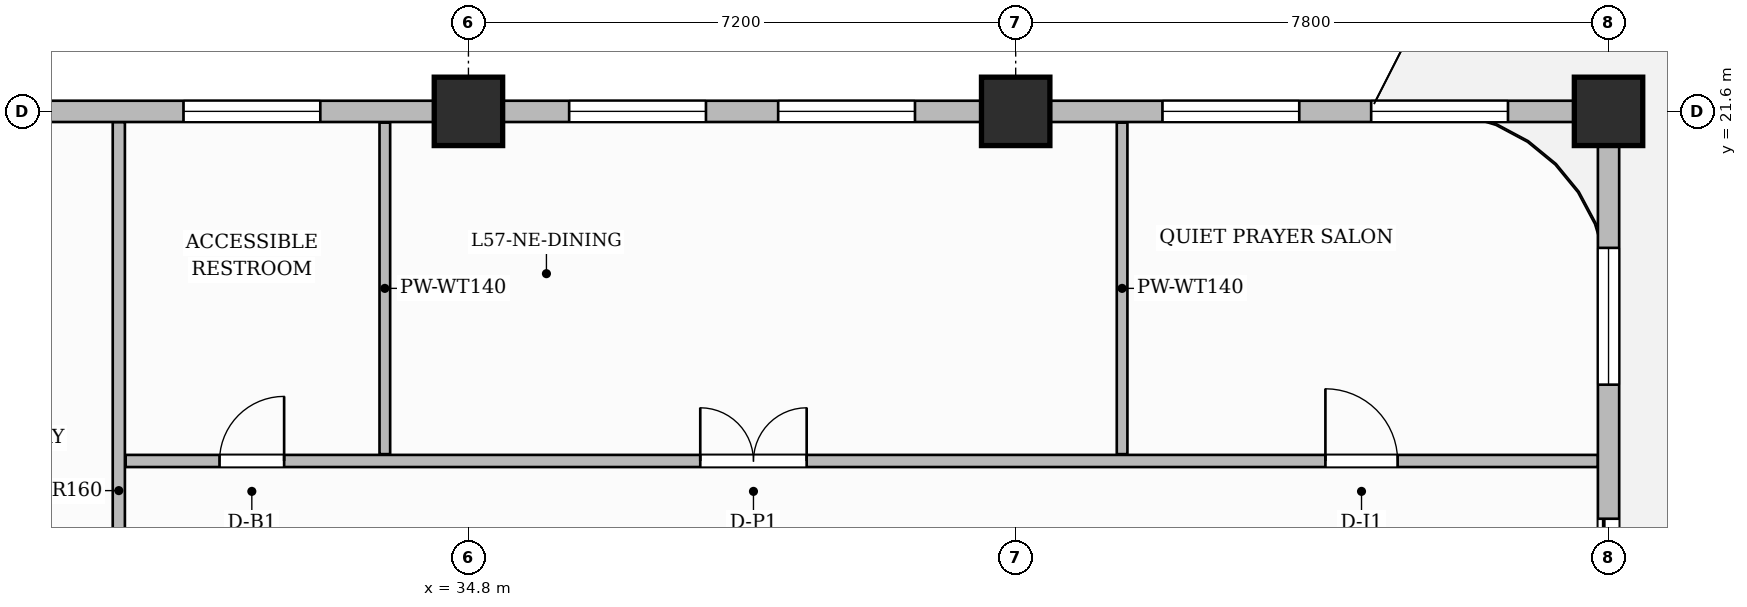
"""IFC4 building model, lengths in metres.
Left out: names, types, materials, properties, quantities, classifications, styles, units other than length and angle.
Written with IfcOpenShell. Run it as: python <this file> out.ifc"""

import sys

from ifc_helpers import new_model, si_unit, direction, frame, frame_2d, origin, origin_2d, place, context, subcontext, project, spatial, rectangle, extrude, source, transform, mapped, element, fill, save


model = new_model("IFC4")
c1 = context("Model", 3, precision=1e-05, world=origin(), true_north=direction((0.0, 1.0)))
c2 = subcontext(c1, "Body", "Model", "MODEL_VIEW")
j1 = project(units=[si_unit("LENGTHUNIT", "METRE"), si_unit("PLANEANGLEUNIT", "RADIAN")], contexts=[c1])
p1 = place(None, origin())
s1 = spatial("IfcSite", under=j1, at=p1, CompositionType="ELEMENT")
p2 = place(p1, origin())
s2 = spatial("IfcBuilding", under=s1, at=p2, CompositionType="ELEMENT")
p3 = place(p2, frame((0.0, 0.0, 228.85)))
s3 = spatial("IfcBuildingStorey", under=s2, at=p3, CompositionType="ELEMENT", Elevation=228.85)
m1 = source(origin(), c2, "Body", "SweptSolid", [
    extrude(rectangle(XDim=0.9, YDim=0.9, at=origin_2d()), origin(), (0.0, 0.0, 1.0), 3.85),
])
for number, where, z_axis, x_axis in (
    (1, (34.8, 21.6, 0.0), (0.0, 0.0, 1.0), (1.0, 0.0, 0.0)),
    (2, (42.0, 21.6, 0.0), (0.0, 0.0, 1.0), (1.0, 0.0, 0.0)),
    (3, (49.8, 21.6, 0.0), (0.0, 0.0, 1.0), (1.0, 0.0, 0.0)),
):
    element("IfcColumn", number, at=place(p3, frame(where, z_axis=z_axis, x_axis=x_axis)), inside=s3, PredefinedType="COLUMN", context=c2, shape_type="MappedRepresentation", body=[
        mapped(m1, transform((0.0, 0.0, 0.0), scale=1.0)),
    ])
p4 = place(p3, frame((30.2, 11.76, 0.0), z_axis=(0.0, 0.0, 1.0), x_axis=(0.0, 1.0, 0.0)))
e4 = element("IfcWall", 4, at=p4, inside=s3, PredefinedType="PARTITIONING", context=c2, shape_type="SweptSolid", body=[
    extrude(rectangle(XDim=9.7, YDim=0.16, at=frame_2d((4.85, 0.0))), origin(), (0.0, 0.0, 1.0), 3.6),
])
p5 = place(p3, frame((30.29, 17.0, 0.0), z_axis=(0.0, 0.0, 1.0), x_axis=(1.0, 0.0, 0.0)))
e5 = element("IfcWall", 5, at=p5, inside=s3, PredefinedType="PARTITIONING", context=c2, shape_type="SweptSolid", body=[
    extrude(rectangle(XDim=19.37, YDim=0.16, at=frame_2d((9.685, 0.0))), origin(), (0.0, 0.0, 1.0), 3.6),
])
p6 = place(p5, frame((1.235, 0.0, 0.0)))
e6 = element("IfcOpeningElement", 6, at=p6, cuts=e5, PredefinedType="OPENING", context=c2, shape_type="SweptSolid", body=[
    extrude(rectangle(XDim=0.85, YDim=2.1, at=frame_2d((0.425, 1.05))), frame((0.0, 0.09, 0.0), z_axis=(0.0, -1.0, 0.0), x_axis=(1.0, 0.0, 0.0)), (0.0, 0.0, 1.0), 0.18),
])
p7 = place(p5, frame((7.56, 0.0, 0.0)))
e7 = element("IfcOpeningElement", 7, at=p7, cuts=e5, PredefinedType="OPENING", context=c2, shape_type="SweptSolid", body=[
    extrude(rectangle(XDim=1.4, YDim=2.35, at=frame_2d((0.7, 1.175))), frame((0.0, 0.09, 0.0), z_axis=(0.0, -1.0, 0.0), x_axis=(1.0, 0.0, 0.0)), (0.0, 0.0, 1.0), 0.18),
])
p8 = place(p5, frame((15.785, 0.0, 0.0)))
e8 = element("IfcOpeningElement", 8, at=p8, cuts=e5, PredefinedType="OPENING", context=c2, shape_type="SweptSolid", body=[
    extrude(rectangle(XDim=0.95, YDim=2.15, at=frame_2d((0.475, 1.075))), frame((0.0, 0.09, 0.0), z_axis=(0.0, -1.0, 0.0), x_axis=(1.0, 0.0, 0.0)), (0.0, 0.0, 1.0), 0.18),
])
for number, where, z_axis, x_axis in (
    (9, (33.7, 17.09, 0.0), (0.0, 0.0, 1.0), (0.0, 1.0, 0.0)),
    (10, (43.4, 17.09, 0.0), (0.0, 0.0, 1.0), (0.0, 1.0, 0.0)),
):
    element("IfcWall", number, at=place(p3, frame(where, z_axis=z_axis, x_axis=x_axis)), inside=s3, PredefinedType="PARTITIONING", context=c2, shape_type="SweptSolid", body=[
        extrude(rectangle(XDim=4.362, YDim=0.14, at=frame_2d((2.181, 0.0))), origin(), (0.0, 0.0, 1.0), 3.6),
    ])
p9 = place(p3, frame((49.8, 14.62, 0.0), z_axis=(0.0, 0.0, 1.0), x_axis=(0.0, 1.0, 0.0)))
e11 = element("IfcWall", 11, at=p9, inside=s3, PredefinedType="SOLIDWALL", context=c2, shape_type="SweptSolid", body=[
    extrude(rectangle(XDim=6.93, YDim=0.28, at=frame_2d((3.465, 0.0))), origin(), (0.0, 0.0, 1.0), 3.135),
])
p10 = place(p9, frame((0.42, 0.0, 0.0)))
e12 = element("IfcOpeningElement", 12, at=p10, cuts=e11, PredefinedType="OPENING", context=c2, shape_type="SweptSolid", body=[
    extrude(rectangle(XDim=1.2, YDim=2.2, at=frame_2d((0.6, 1.1))), frame((0.0, 0.15, 0.0), z_axis=(0.0, -1.0, 0.0), x_axis=(1.0, 0.0, 0.0)), (0.0, 0.0, 1.0), 0.3),
])
p11 = place(p9, frame((3.384, 0.0, 0.8)))
e13 = element("IfcOpeningElement", 13, at=p11, cuts=e11, PredefinedType="OPENING", context=c2, shape_type="SweptSolid", body=[
    extrude(rectangle(XDim=1.8, YDim=1.85, at=frame_2d((0.9, 0.925))), frame((0.0, 0.15, 0.0), z_axis=(0.0, -1.0, 0.0), x_axis=(1.0, 0.0, 0.0)), (0.0, 0.0, 1.0), 0.3),
])
p12 = place(p3, frame((14.4, 21.6, 0.0), z_axis=(0.0, 0.0, 1.0), x_axis=(1.0, 0.0, 0.0)))
e14 = element("IfcWall", 14, at=p12, inside=s3, PredefinedType="SOLIDWALL", context=c2, shape_type="SweptSolid", body=[
    extrude(rectangle(XDim=35.4, YDim=0.28, at=frame_2d((17.7, 0.0))), origin(), (0.0, 0.0, 1.0), 3.135),
])
p13 = place(p12, frame((0.85, 0.0, 0.0)))
e15 = element("IfcOpeningElement", 15, at=p13, cuts=e14, PredefinedType="OPENING", context=c2, shape_type="SweptSolid", body=[
    extrude(rectangle(XDim=1.2, YDim=2.2, at=frame_2d((0.6, 1.1))), frame((0.0, 0.15, 0.0), z_axis=(0.0, -1.0, 0.0), x_axis=(1.0, 0.0, 0.0)), (0.0, 0.0, 1.0), 0.3),
])
p14 = place(p12, frame((2.811, 0.0, 0.8)))
e16 = element("IfcOpeningElement", 16, at=p14, cuts=e14, PredefinedType="OPENING", context=c2, shape_type="SweptSolid", body=[
    extrude(rectangle(XDim=1.8, YDim=1.85, at=frame_2d((0.9, 0.925))), frame((0.0, 0.15, 0.0), z_axis=(0.0, -1.0, 0.0), x_axis=(1.0, 0.0, 0.0)), (0.0, 0.0, 1.0), 0.3),
])
p15 = place(p12, frame((5.269, 0.0, 0.8)))
e17 = element("IfcOpeningElement", 17, at=p15, cuts=e14, PredefinedType="OPENING", context=c2, shape_type="SweptSolid", body=[
    extrude(rectangle(XDim=0.95, YDim=1.75, at=frame_2d((0.475, 0.875))), frame((0.0, 0.15, 0.0), z_axis=(0.0, -1.0, 0.0), x_axis=(1.0, 0.0, 0.0)), (0.0, 0.0, 1.0), 0.3),
])
p16 = place(p12, frame((8.696, 0.0, 0.8)))
e18 = element("IfcOpeningElement", 18, at=p16, cuts=e14, PredefinedType="OPENING", context=c2, shape_type="SweptSolid", body=[
    extrude(rectangle(XDim=1.8, YDim=1.85, at=frame_2d((0.9, 0.925))), frame((0.0, 0.15, 0.0), z_axis=(0.0, -1.0, 0.0), x_axis=(1.0, 0.0, 0.0)), (0.0, 0.0, 1.0), 0.3),
])
p17 = place(p12, frame((11.704, 0.0, 0.8)))
e19 = element("IfcOpeningElement", 19, at=p17, cuts=e14, PredefinedType="OPENING", context=c2, shape_type="SweptSolid", body=[
    extrude(rectangle(XDim=1.4, YDim=1.85, at=frame_2d((0.7, 0.925))), frame((0.0, 0.15, 0.0), z_axis=(0.0, -1.0, 0.0), x_axis=(1.0, 0.0, 0.0)), (0.0, 0.0, 1.0), 0.3),
])
p18 = place(p12, frame((16.651, 0.0, 0.8)))
e20 = element("IfcOpeningElement", 20, at=p18, cuts=e14, PredefinedType="OPENING", context=c2, shape_type="SweptSolid", body=[
    extrude(rectangle(XDim=1.8, YDim=1.85, at=frame_2d((0.9, 0.925))), frame((0.0, 0.15, 0.0), z_axis=(0.0, -1.0, 0.0), x_axis=(1.0, 0.0, 0.0)), (0.0, 0.0, 1.0), 0.3),
])
p19 = place(p12, frame((21.725, 0.0, 0.8)))
e21 = element("IfcOpeningElement", 21, at=p19, cuts=e14, PredefinedType="OPENING", context=c2, shape_type="SweptSolid", body=[
    extrude(rectangle(XDim=1.8, YDim=1.85, at=frame_2d((0.9, 0.925))), frame((0.0, 0.15, 0.0), z_axis=(0.0, -1.0, 0.0), x_axis=(1.0, 0.0, 0.0)), (0.0, 0.0, 1.0), 0.3),
])
p20 = place(p12, frame((24.475, 0.0, 0.8)))
e22 = element("IfcOpeningElement", 22, at=p20, cuts=e14, PredefinedType="OPENING", context=c2, shape_type="SweptSolid", body=[
    extrude(rectangle(XDim=1.8, YDim=1.85, at=frame_2d((0.9, 0.925))), frame((0.0, 0.15, 0.0), z_axis=(0.0, -1.0, 0.0), x_axis=(1.0, 0.0, 0.0)), (0.0, 0.0, 1.0), 0.3),
])
p21 = place(p12, frame((29.531, 0.0, 0.8)))
e23 = element("IfcOpeningElement", 23, at=p21, cuts=e14, PredefinedType="OPENING", context=c2, shape_type="SweptSolid", body=[
    extrude(rectangle(XDim=1.8, YDim=1.85, at=frame_2d((0.9, 0.925))), frame((0.0, 0.15, 0.0), z_axis=(0.0, -1.0, 0.0), x_axis=(1.0, 0.0, 0.0)), (0.0, 0.0, 1.0), 0.3),
])
p22 = place(p12, frame((32.277, 0.0, 0.8)))
e24 = element("IfcOpeningElement", 24, at=p22, cuts=e14, PredefinedType="OPENING", context=c2, shape_type="SweptSolid", body=[
    extrude(rectangle(XDim=1.8, YDim=1.85, at=frame_2d((0.9, 0.925))), frame((0.0, 0.15, 0.0), z_axis=(0.0, -1.0, 0.0), x_axis=(1.0, 0.0, 0.0)), (0.0, 0.0, 1.0), 0.3),
])
m2 = source(origin(), c2, "Body", "SweptSolid", [
    extrude(rectangle(XDim=0.85, YDim=2.1, at=frame_2d((0.425, 1.05))), frame((0.0, 0.025, 0.0), z_axis=(0.0, -1.0, 0.0), x_axis=(1.0, 0.0, 0.0)), (0.0, 0.0, 1.0), 0.05),
])
p23 = place(p6, origin())
e25 = element("IfcDoor", 25, at=p23, inside=s3, OperationType="SINGLE_SWING_RIGHT", PredefinedType="DOOR", context=c2, shape_type="MappedRepresentation", body=[
    mapped(m2, transform((0.0, 0.0, 0.0), scale=1.0)),
])
fill(e6, e25)
m3 = source(origin(), c2, "Body", "SweptSolid", [
    extrude(rectangle(XDim=1.4, YDim=2.35, at=frame_2d((0.7, 1.175))), frame((0.0, 0.025, 0.0), z_axis=(0.0, -1.0, 0.0), x_axis=(1.0, 0.0, 0.0)), (0.0, 0.0, 1.0), 0.05),
])
p24 = place(p7, origin())
e26 = element("IfcDoor", 26, at=p24, inside=s3, OperationType="DOUBLE_DOOR_SINGLE_SWING", PredefinedType="DOOR", context=c2, shape_type="MappedRepresentation", body=[
    mapped(m3, transform((0.0, 0.0, 0.0), scale=1.0)),
])
fill(e7, e26)
m4 = source(origin(), c2, "Body", "SweptSolid", [
    extrude(rectangle(XDim=0.95, YDim=2.15, at=frame_2d((0.475, 1.075))), frame((0.0, 0.025, 0.0), z_axis=(0.0, -1.0, 0.0), x_axis=(1.0, 0.0, 0.0)), (0.0, 0.0, 1.0), 0.05),
])
p25 = place(p8, origin())
e27 = element("IfcDoor", 27, at=p25, inside=s3, OperationType="SINGLE_SWING_LEFT", PredefinedType="DOOR", context=c2, shape_type="MappedRepresentation", body=[
    mapped(m4, transform((0.0, 0.0, 0.0), scale=1.0)),
])
fill(e8, e27)
m5 = source(origin(), c2, "Body", "SweptSolid", [
    extrude(rectangle(XDim=1.2, YDim=2.2, at=frame_2d((0.6, 1.1))), frame((0.0, 0.025, 0.0), z_axis=(0.0, -1.0, 0.0), x_axis=(1.0, 0.0, 0.0)), (0.0, 0.0, 1.0), 0.05),
])
p26 = place(p10, origin())
e28 = element("IfcDoor", 28, at=p26, inside=s3, OperationType="SLIDING_TO_LEFT", PredefinedType="DOOR", context=c2, shape_type="MappedRepresentation", body=[
    mapped(m5, transform((0.0, 0.0, 0.0), scale=1.0)),
])
fill(e12, e28)
m6 = source(origin(), c2, "Body", "SweptSolid", [
    extrude(rectangle(XDim=1.8, YDim=1.85, at=frame_2d((0.9, 0.925))), frame((0.0, 0.03, 0.0), z_axis=(0.0, -1.0, 0.0), x_axis=(1.0, 0.0, 0.0)), (0.0, 0.0, 1.0), 0.06),
])
p27 = place(p11, origin())
e29 = element("IfcWindow", 29, at=p27, inside=s3, PartitioningType="DOUBLE_PANEL_VERTICAL", PredefinedType="WINDOW", context=c2, shape_type="MappedRepresentation", body=[
    mapped(m6, transform((0.0, 0.0, 0.0), scale=1.0)),
])
fill(e13, e29)
p28 = place(p18, origin())
e30 = element("IfcWindow", 30, at=p28, inside=s3, PartitioningType="DOUBLE_PANEL_VERTICAL", PredefinedType="WINDOW", context=c2, shape_type="MappedRepresentation", body=[
    mapped(m6, transform((0.0, 0.0, 0.0), scale=1.0)),
])
fill(e20, e30)
p29 = place(p19, origin())
e31 = element("IfcWindow", 31, at=p29, inside=s3, PartitioningType="DOUBLE_PANEL_VERTICAL", PredefinedType="WINDOW", context=c2, shape_type="MappedRepresentation", body=[
    mapped(m6, transform((0.0, 0.0, 0.0), scale=1.0)),
])
fill(e21, e31)
p30 = place(p20, origin())
e32 = element("IfcWindow", 32, at=p30, inside=s3, PartitioningType="DOUBLE_PANEL_VERTICAL", PredefinedType="WINDOW", context=c2, shape_type="MappedRepresentation", body=[
    mapped(m6, transform((0.0, 0.0, 0.0), scale=1.0)),
])
fill(e22, e32)
p31 = place(p21, origin())
e33 = element("IfcWindow", 33, at=p31, inside=s3, PartitioningType="DOUBLE_PANEL_VERTICAL", PredefinedType="WINDOW", context=c2, shape_type="MappedRepresentation", body=[
    mapped(m6, transform((0.0, 0.0, 0.0), scale=1.0)),
])
fill(e23, e33)
p32 = place(p22, origin())
e34 = element("IfcWindow", 34, at=p32, inside=s3, PartitioningType="DOUBLE_PANEL_VERTICAL", PredefinedType="WINDOW", context=c2, shape_type="MappedRepresentation", body=[
    mapped(m6, transform((0.0, 0.0, 0.0), scale=1.0)),
])
fill(e24, e34)
save(model, sys.argv[1])
